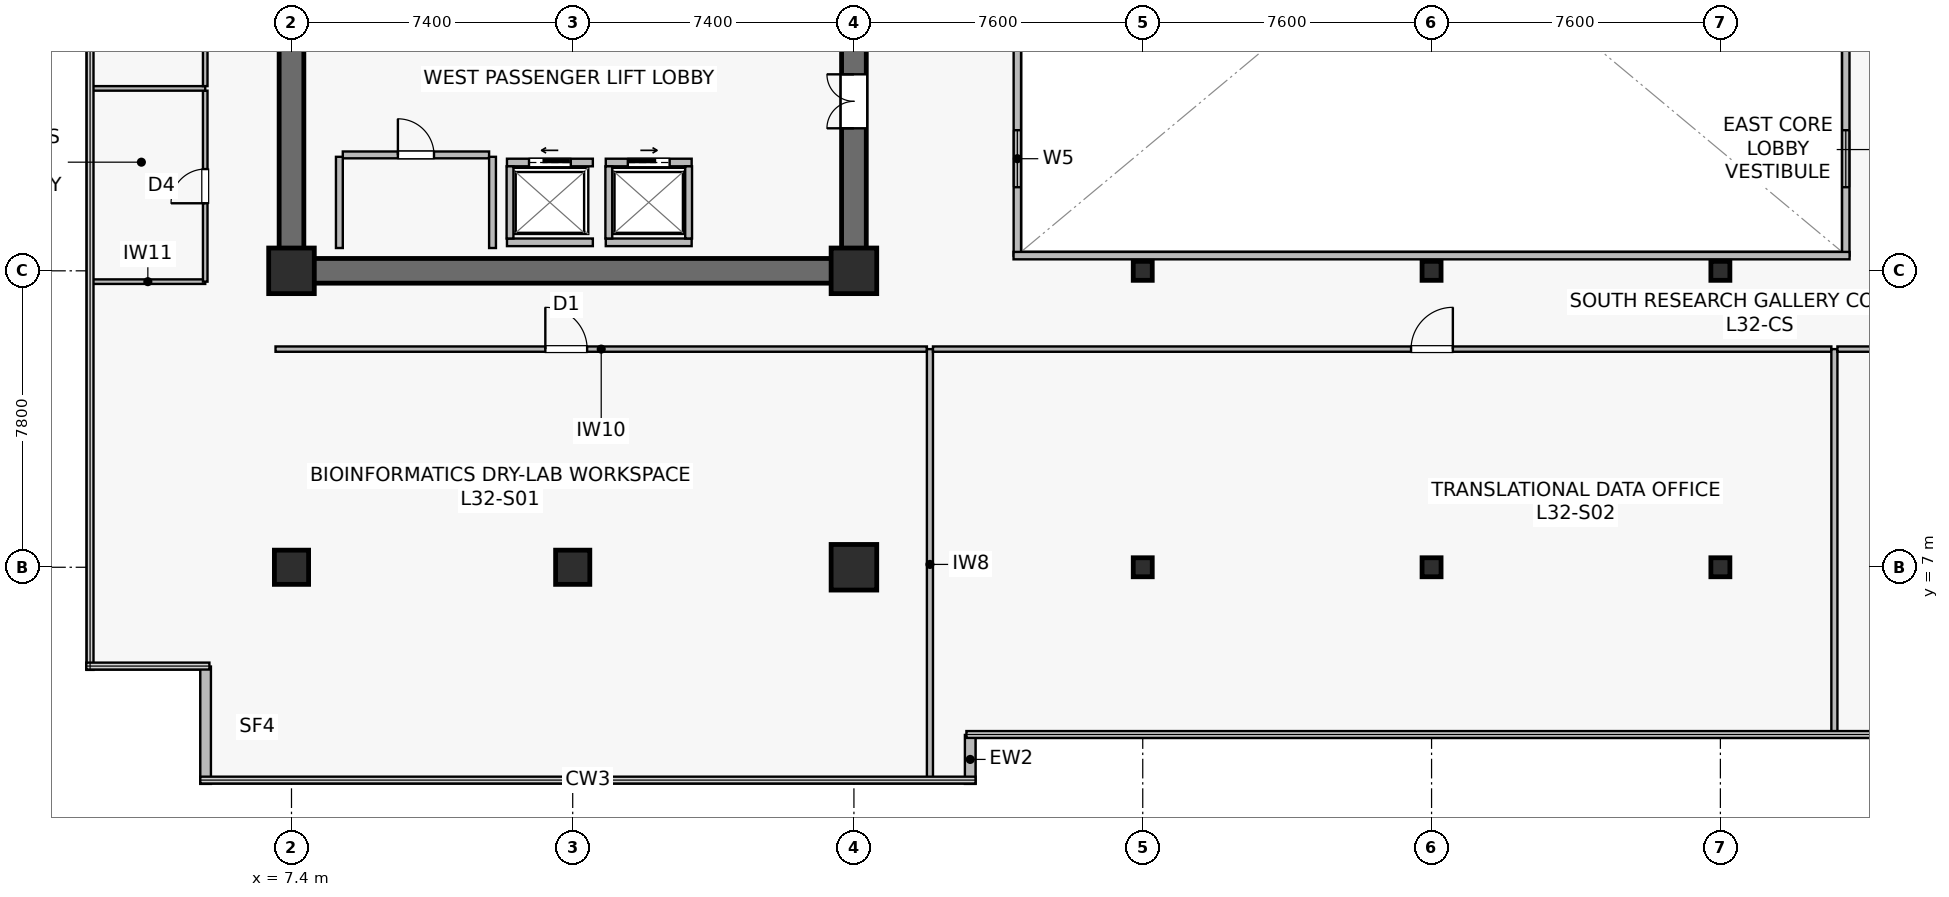
"""IFC4 building model, lengths in metres.
Left out: names, types, materials, properties, quantities, classifications, styles, units other than length and angle.
Written with IfcOpenShell. Run it as: python <this file> out.ifc"""

import sys

from ifc_helpers import new_model, si_unit, direction, frame, frame_2d, origin, origin_2d, place, context, subcontext, project, spatial, rectangle, hollow_rectangle, extrude, source, transform, mapped, element, fill, save


model = new_model("IFC4")
c1 = context("Model", 3, precision=1e-05, world=origin(), true_north=direction((0.0, 1.0)))
c2 = subcontext(c1, "Body", "Model", "MODEL_VIEW")
j1 = project(units=[si_unit("LENGTHUNIT", "METRE"), si_unit("PLANEANGLEUNIT", "RADIAN")], contexts=[c1])
p1 = place(None, origin())
s1 = spatial("IfcSite", under=j1, at=p1, CompositionType="ELEMENT")
p2 = place(p1, origin())
s2 = spatial("IfcBuilding", under=s1, at=p2, CompositionType="ELEMENT")
p3 = place(p2, frame((0.0, 0.0, 133.8)))
s3 = spatial("IfcBuildingStorey", under=s2, at=p3, CompositionType="ELEMENT", Elevation=133.8)
p4 = place(p3, frame((7.075, 14.8, 0.0), z_axis=(0.0, 0.0, 1.0), x_axis=(1.0, 0.0, 0.0)))
e1 = element("IfcWall", 1, at=p4, inside=s3, PredefinedType="SHEAR", context=c2, shape_type="SweptSolid", body=[
    extrude(rectangle(XDim=15.45, YDim=0.65, at=frame_2d((7.725, 0.0))), origin(), (0.0, 0.0, 1.0), 3.79),
])
p5 = place(p3, frame((7.4, 15.125, 0.0), z_axis=(0.0, 0.0, 1.0), x_axis=(0.0, 1.0, 0.0)))
e2 = element("IfcWall", 2, at=p5, inside=s3, PredefinedType="SHEAR", context=c2, shape_type="SweptSolid", body=[
    extrude(rectangle(XDim=18.35, YDim=0.65, at=frame_2d((9.175, 0.0))), origin(), (0.0, 0.0, 1.0), 3.79),
])
p6 = place(p3, frame((22.2, 15.125, 0.0), z_axis=(0.0, 0.0, 1.0), x_axis=(0.0, 1.0, 0.0)))
e3 = element("IfcWall", 3, at=p6, inside=s3, PredefinedType="SHEAR", context=c2, shape_type="SweptSolid", body=[
    extrude(rectangle(XDim=18.35, YDim=0.65, at=frame_2d((9.175, 0.0))), origin(), (0.0, 0.0, 1.0), 3.79),
])
p7 = place(p6, frame((3.425, 0.0, 0.0)))
e4 = element("IfcOpeningElement", 4, at=p7, cuts=e3, PredefinedType="OPENING", context=c2, shape_type="SweptSolid", body=[
    extrude(rectangle(XDim=1.42, YDim=2.2, at=frame_2d((0.71, 1.1))), frame((0.0, 0.335, 0.0), z_axis=(0.0, -1.0, 0.0), x_axis=(1.0, 0.0, 0.0)), (0.0, 0.0, 1.0), 0.67),
])
m1 = source(origin(), c2, "Body", "SweptSolid", [
    extrude(rectangle(XDim=0.9, YDim=0.9, at=origin_2d()), origin(), (0.0, 0.0, 1.0), 4.1),
])
p8 = place(p3, frame((14.8, 7.0, 0.0), z_axis=(0.0, 0.0, 1.0), x_axis=(1.0, 0.0, 0.0)))
e5 = element("IfcColumn", 5, at=p8, inside=s3, PredefinedType="COLUMN", context=c2, shape_type="MappedRepresentation", body=[
    mapped(m1, transform((0.0, 0.0, 0.0), scale=1.0)),
])
m2 = source(origin(), c2, "Body", "SweptSolid", [
    extrude(rectangle(XDim=1.2, YDim=1.2, at=origin_2d()), origin(), (0.0, 0.0, 1.0), 4.1),
])
for number, where, z_axis, x_axis in (
    (6, (22.2, 7.0, 0.0), (0.0, 0.0, 1.0), (1.0, 0.0, 0.0)),
    (7, (7.4, 14.8, 0.0), (0.0, 0.0, 1.0), (1.0, 0.0, 0.0)),
    (8, (22.2, 14.8, 0.0), (0.0, 0.0, 1.0), (1.0, 0.0, 0.0)),
):
    element("IfcColumn", number, at=place(p3, frame(where, z_axis=z_axis, x_axis=x_axis)), inside=s3, PredefinedType="COLUMN", context=c2, shape_type="MappedRepresentation", body=[
        mapped(m2, transform((0.0, 0.0, 0.0), scale=1.0)),
    ])
p9 = place(p3, frame((7.4, 7.0, 0.0), z_axis=(0.0, 0.0, 1.0), x_axis=(1.0, 0.0, 0.0)))
e9 = element("IfcColumn", 9, at=p9, inside=s3, PredefinedType="COLUMN", context=c2, shape_type="MappedRepresentation", body=[
    mapped(m1, transform((0.0, 0.0, 0.0), scale=1.0)),
])
m3 = source(origin(), c2, "Body", "SweptSolid", [
    extrude(hollow_rectangle(XDim=0.5, YDim=0.5, WallThickness=0.022, at=origin_2d()), origin(), (0.0, 0.0, 1.0), 4.1),
])
for number, where, z_axis, x_axis in (
    (10, (29.8, 7.0, 0.0), (0.0, 0.0, 1.0), (1.0, 0.0, 0.0)),
    (11, (29.8, 14.8, 0.0), (0.0, 0.0, 1.0), (1.0, 0.0, 0.0)),
    (12, (37.4, 7.0, 0.0), (0.0, 0.0, 1.0), (1.0, 0.0, 0.0)),
    (13, (37.4, 14.8, 0.0), (0.0, 0.0, 1.0), (1.0, 0.0, 0.0)),
    (14, (45.0, 7.0, 0.0), (0.0, 0.0, 1.0), (1.0, 0.0, 0.0)),
    (15, (45.0, 14.8, 0.0), (0.0, 0.0, 1.0), (1.0, 0.0, 0.0)),
):
    element("IfcColumn", number, at=place(p3, frame(where, z_axis=z_axis, x_axis=x_axis)), inside=s3, PredefinedType="COLUMN", context=c2, shape_type="MappedRepresentation", body=[
        mapped(m3, transform((0.0, 0.0, 0.0), scale=1.0)),
    ])
p10 = place(p3, frame((25.26, 1.3, 0.0), z_axis=(0.0, 0.0, 1.0), x_axis=(0.0, 1.0, 0.0)))
e16 = element("IfcWall", 16, at=p10, inside=s3, PredefinedType="STANDARD", context=c2, shape_type="SweptSolid", body=[
    extrude(rectangle(XDim=1.288, YDim=0.28, at=frame_2d((0.644, 0.0))), origin(), (0.0, 0.0, 1.0), 3.79),
])
p11 = place(p3, frame((5.14, 4.388, 0.0), z_axis=(0.0, 0.0, 1.0), x_axis=(0.0, -1.0, 0.0)))
e17 = element("IfcWall", 17, at=p11, inside=s3, PredefinedType="STANDARD", context=c2, shape_type="SweptSolid", body=[
    extrude(rectangle(XDim=3.088, YDim=0.28, at=frame_2d((1.544, 0.0))), origin(), (0.0, 0.0, 1.0), 3.79),
])
p12 = place(p3, frame((13.07, 17.65, 0.0), z_axis=(0.0, 0.0, 1.0), x_axis=(1.0, 0.0, 0.0)))
e18 = element("IfcWall", 18, at=p12, inside=s3, PredefinedType="SOLIDWALL", context=c2, shape_type="SweptSolid", body=[
    extrude(rectangle(XDim=2.26, YDim=0.2, at=frame_2d((1.13, 0.0))), origin(), (0.0, 0.0, 1.0), 3.125),
])
p13 = place(p12, frame((0.58, 0.0, 0.0)))
e19 = element("IfcOpeningElement", 19, at=p13, cuts=e18, PredefinedType="OPENING", context=c2, shape_type="SweptSolid", body=[
    extrude(rectangle(XDim=1.1, YDim=2.22, at=frame_2d((0.55, 1.11))), frame((0.0, 0.11, 0.0), z_axis=(0.0, -1.0, 0.0), x_axis=(1.0, 0.0, 0.0)), (0.0, 0.0, 1.0), 0.22),
])
p14 = place(p3, frame((13.07, 15.55, 0.0), z_axis=(0.0, 0.0, 1.0), x_axis=(1.0, 0.0, 0.0)))
e20 = element("IfcWall", 20, at=p14, inside=s3, PredefinedType="SOLIDWALL", context=c2, shape_type="SweptSolid", body=[
    extrude(rectangle(XDim=2.26, YDim=0.2, at=frame_2d((1.13, 0.0))), origin(), (0.0, 0.0, 1.0), 3.125),
])
p15 = place(p3, frame((13.15, 15.65, 0.0), z_axis=(0.0, 0.0, 1.0), x_axis=(0.0, 1.0, 0.0)))
e21 = element("IfcWall", 21, at=p15, inside=s3, PredefinedType="SOLIDWALL", context=c2, shape_type="SweptSolid", body=[
    extrude(rectangle(XDim=1.9, YDim=0.18, at=frame_2d((0.95, 0.0))), origin(), (0.0, 0.0, 1.0), 3.79),
])
p16 = place(p3, frame((15.67, 17.65, 0.0), z_axis=(0.0, 0.0, 1.0), x_axis=(1.0, 0.0, 0.0)))
e22 = element("IfcWall", 22, at=p16, inside=s3, PredefinedType="SOLIDWALL", context=c2, shape_type="SweptSolid", body=[
    extrude(rectangle(XDim=2.26, YDim=0.2, at=frame_2d((1.13, 0.0))), origin(), (0.0, 0.0, 1.0), 3.79),
])
p17 = place(p16, frame((0.58, 0.0, 0.0)))
e23 = element("IfcOpeningElement", 23, at=p17, cuts=e22, PredefinedType="OPENING", context=c2, shape_type="SweptSolid", body=[
    extrude(rectangle(XDim=1.1, YDim=2.22, at=frame_2d((0.55, 1.11))), frame((0.0, 0.11, 0.0), z_axis=(0.0, -1.0, 0.0), x_axis=(1.0, 0.0, 0.0)), (0.0, 0.0, 1.0), 0.22),
])
p18 = place(p3, frame((15.67, 15.55, 0.0), z_axis=(0.0, 0.0, 1.0), x_axis=(1.0, 0.0, 0.0)))
e24 = element("IfcWall", 24, at=p18, inside=s3, PredefinedType="SOLIDWALL", context=c2, shape_type="SweptSolid", body=[
    extrude(rectangle(XDim=2.26, YDim=0.2, at=frame_2d((1.13, 0.0))), origin(), (0.0, 0.0, 1.0), 3.79),
])
for number, where, z_axis, x_axis in (
    (25, (15.75, 15.65, 0.0), (0.0, 0.0, 1.0), (0.0, 1.0, 0.0)),
    (26, (17.85, 15.65, 0.0), (0.0, 0.0, 1.0), (0.0, 1.0, 0.0)),
):
    element("IfcWall", number, at=place(p3, frame(where, z_axis=z_axis, x_axis=x_axis)), inside=s3, PredefinedType="SOLIDWALL", context=c2, shape_type="SweptSolid", body=[
        extrude(rectangle(XDim=1.9, YDim=0.18, at=frame_2d((0.95, 0.0))), origin(), (0.0, 0.0, 1.0), 3.79),
    ])
p19 = place(p3, frame((8.75, 17.85, 0.0), z_axis=(0.0, 0.0, 1.0), x_axis=(1.0, 0.0, 0.0)))
e27 = element("IfcWall", 27, at=p19, inside=s3, PredefinedType="SOLIDWALL", context=c2, shape_type="SweptSolid", body=[
    extrude(rectangle(XDim=3.85, YDim=0.18, at=frame_2d((1.925, 0.0))), origin(), (0.0, 0.0, 1.0), 3.79),
])
p20 = place(p19, frame((1.45, 0.0, 0.0)))
e28 = element("IfcOpeningElement", 28, at=p20, cuts=e27, PredefinedType="OPENING", context=c2, shape_type="SweptSolid", body=[
    extrude(rectangle(XDim=0.95, YDim=2.15, at=frame_2d((0.475, 1.075))), frame((0.0, 0.1, 0.0), z_axis=(0.0, -1.0, 0.0), x_axis=(1.0, 0.0, 0.0)), (0.0, 0.0, 1.0), 0.2),
])
for number, where, z_axis, x_axis in (
    (29, (12.69, 15.4, 0.0), (0.0, 0.0, 1.0), (0.0, 1.0, 0.0)),
    (30, (8.66, 15.4, 0.0), (0.0, 0.0, 1.0), (0.0, 1.0, 0.0)),
):
    element("IfcWall", number, at=place(p3, frame(where, z_axis=z_axis, x_axis=x_axis)), inside=s3, PredefinedType="SOLIDWALL", context=c2, shape_type="SweptSolid", body=[
        extrude(rectangle(XDim=2.4, YDim=0.18, at=frame_2d((1.2, 0.0))), origin(), (0.0, 0.0, 1.0), 3.79),
    ])
p21 = place(p3, frame((26.5, 15.2, 0.0), z_axis=(0.0, 0.0, 1.0), x_axis=(0.0, 1.0, 0.0)))
e31 = element("IfcWall", 31, at=p21, inside=s3, PredefinedType="SOLIDWALL", context=c2, shape_type="SweptSolid", body=[
    extrude(rectangle(XDim=18.2, YDim=0.195, at=frame_2d((9.1, 0.0))), origin(), (0.0, 0.0, 1.0), 3.79),
])
p22 = place(p21, frame((1.8, 0.0, 0.9)))
e32 = element("IfcOpeningElement", 32, at=p22, cuts=e31, PredefinedType="OPENING", context=c2, shape_type="SweptSolid", body=[
    extrude(rectangle(XDim=1.5, YDim=1.4, at=frame_2d((0.75, 0.7))), frame((0.0, 0.107, 0.0), z_axis=(0.0, -1.0, 0.0), x_axis=(1.0, 0.0, 0.0)), (0.0, 0.0, 1.0), 0.215),
])
p23 = place(p21, frame((13.2, 0.0, 0.9)))
e33 = element("IfcOpeningElement", 33, at=p23, cuts=e31, PredefinedType="OPENING", context=c2, shape_type="SweptSolid", body=[
    extrude(rectangle(XDim=1.5, YDim=1.4, at=frame_2d((0.75, 0.7))), frame((0.0, 0.107, 0.0), z_axis=(0.0, -1.0, 0.0), x_axis=(1.0, 0.0, 0.0)), (0.0, 0.0, 1.0), 0.215),
])
p24 = place(p3, frame((48.3, 15.2, 0.0), z_axis=(0.0, 0.0, 1.0), x_axis=(0.0, 1.0, 0.0)))
e34 = element("IfcWall", 34, at=p24, inside=s3, PredefinedType="SOLIDWALL", context=c2, shape_type="SweptSolid", body=[
    extrude(rectangle(XDim=18.2, YDim=0.195, at=frame_2d((9.1, 0.0))), origin(), (0.0, 0.0, 1.0), 3.79),
])
p25 = place(p24, frame((1.8, 0.0, 0.9)))
e35 = element("IfcOpeningElement", 35, at=p25, cuts=e34, PredefinedType="OPENING", context=c2, shape_type="SweptSolid", body=[
    extrude(rectangle(XDim=1.5, YDim=1.4, at=frame_2d((0.75, 0.7))), frame((0.0, 0.107, 0.0), z_axis=(0.0, -1.0, 0.0), x_axis=(1.0, 0.0, 0.0)), (0.0, 0.0, 1.0), 0.215),
])
p26 = place(p24, frame((13.2, 0.0, 0.9)))
e36 = element("IfcOpeningElement", 36, at=p26, cuts=e34, PredefinedType="OPENING", context=c2, shape_type="SweptSolid", body=[
    extrude(rectangle(XDim=1.5, YDim=1.4, at=frame_2d((0.75, 0.7))), frame((0.0, 0.107, 0.0), z_axis=(0.0, -1.0, 0.0), x_axis=(1.0, 0.0, 0.0)), (0.0, 0.0, 1.0), 0.215),
])
p27 = place(p3, frame((26.4, 15.2, 0.0), z_axis=(0.0, 0.0, 1.0), x_axis=(1.0, 0.0, 0.0)))
e37 = element("IfcWall", 37, at=p27, inside=s3, PredefinedType="SOLIDWALL", context=c2, shape_type="SweptSolid", body=[
    extrude(rectangle(XDim=22.0, YDim=0.195, at=frame_2d((11.0, 0.0))), origin(), (0.0, 0.0, 1.0), 3.79),
])
p28 = place(p3, frame((6.98, 12.74, 0.0), z_axis=(0.0, 0.0, 1.0), x_axis=(1.0, 0.0, 0.0)))
e38 = element("IfcWall", 38, at=p28, inside=s3, PredefinedType="PARTITIONING", context=c2, shape_type="SweptSolid", body=[
    extrude(rectangle(XDim=17.14, YDim=0.14, at=frame_2d((8.57, 0.0))), origin(), (0.0, 0.0, 1.0), 3.125),
])
p29 = place(p28, frame((7.1, 0.0, 0.0)))
e39 = element("IfcOpeningElement", 39, at=p29, cuts=e38, PredefinedType="OPENING", context=c2, shape_type="SweptSolid", body=[
    extrude(rectangle(XDim=1.1, YDim=2.18, at=frame_2d((0.55, 1.09))), frame((0.0, 0.08, 0.0), z_axis=(0.0, -1.0, 0.0), x_axis=(1.0, 0.0, 0.0)), (0.0, 0.0, 1.0), 0.16),
])
p30 = place(p3, frame((24.2, 1.41, 0.0), z_axis=(0.0, 0.0, 1.0), x_axis=(0.0, 1.0, 0.0)))
e40 = element("IfcWall", 40, at=p30, inside=s3, PredefinedType="PARTITIONING", context=c2, shape_type="SweptSolid", body=[
    extrude(rectangle(XDim=11.33, YDim=0.16, at=frame_2d((5.665, 0.0))), origin(), (0.0, 0.0, 1.0), 3.075),
])
p31 = place(p3, frame((24.28, 12.74, 0.0), z_axis=(0.0, 0.0, 1.0), x_axis=(1.0, 0.0, 0.0)))
e41 = element("IfcWall", 41, at=p31, inside=s3, PredefinedType="PARTITIONING", context=c2, shape_type="SweptSolid", body=[
    extrude(rectangle(XDim=23.64, YDim=0.14, at=frame_2d((11.82, 0.0))), origin(), (0.0, 0.0, 1.0), 3.125),
])
p32 = place(p31, frame((12.58, 0.0, 0.0)))
e42 = element("IfcOpeningElement", 42, at=p32, cuts=e41, PredefinedType="OPENING", context=c2, shape_type="SweptSolid", body=[
    extrude(rectangle(XDim=1.1, YDim=2.18, at=frame_2d((0.55, 1.09))), frame((0.0, 0.08, 0.0), z_axis=(0.0, -1.0, 0.0), x_axis=(1.0, 0.0, 0.0)), (0.0, 0.0, 1.0), 0.16),
])
p33 = place(p3, frame((48.0, 2.61, 0.0), z_axis=(0.0, 0.0, 1.0), x_axis=(0.0, 1.0, 0.0)))
e43 = element("IfcWall", 43, at=p33, inside=s3, PredefinedType="PARTITIONING", context=c2, shape_type="SweptSolid", body=[
    extrude(rectangle(XDim=10.13, YDim=0.16, at=frame_2d((5.065, 0.0))), origin(), (0.0, 0.0, 1.0), 3.075),
])
p34 = place(p3, frame((48.08, 12.74, 0.0), z_axis=(0.0, 0.0, 1.0), x_axis=(1.0, 0.0, 0.0)))
e44 = element("IfcWall", 44, at=p34, inside=s3, PredefinedType="PARTITIONING", context=c2, shape_type="SweptSolid", body=[
    extrude(rectangle(XDim=19.74, YDim=0.14, at=frame_2d((9.87, 0.0))), origin(), (0.0, 0.0, 1.0), 3.125),
])
p35 = place(p34, frame((8.244, 0.0, 0.0)))
e45 = element("IfcOpeningElement", 45, at=p35, cuts=e44, PredefinedType="OPENING", context=c2, shape_type="SweptSolid", body=[
    extrude(rectangle(XDim=1.1, YDim=2.18, at=frame_2d((0.55, 1.09))), frame((0.0, 0.08, 0.0), z_axis=(0.0, -1.0, 0.0), x_axis=(1.0, 0.0, 0.0)), (0.0, 0.0, 1.0), 0.16),
])
p36 = place(p3, frame((2.11, 14.515, 0.0), z_axis=(0.0, 0.0, 1.0), x_axis=(1.0, 0.0, 0.0)))
e46 = element("IfcWall", 46, at=p36, inside=s3, PredefinedType="PARTITIONING", context=c2, shape_type="SweptSolid", body=[
    extrude(rectangle(XDim=3.02, YDim=0.12, at=frame_2d((1.51, 0.0))), origin(), (0.0, 0.0, 1.0), 3.79),
])
p37 = place(p3, frame((5.13, 14.515, 0.0), z_axis=(0.0, 0.0, 1.0), x_axis=(0.0, 1.0, 0.0)))
e47 = element("IfcWall", 47, at=p37, inside=s3, PredefinedType="PARTITIONING", context=c2, shape_type="SweptSolid", body=[
    extrude(rectangle(XDim=5.025, YDim=0.12, at=frame_2d((2.513, 0.0))), origin(), (0.0, 0.0, 1.0), 3.79),
])
p38 = place(p37, frame((2.062, 0.0, 0.0)))
e48 = element("IfcOpeningElement", 48, at=p38, cuts=e47, PredefinedType="OPENING", context=c2, shape_type="SweptSolid", body=[
    extrude(rectangle(XDim=0.9, YDim=2.1, at=frame_2d((0.45, 1.05))), frame((0.0, 0.07, 0.0), z_axis=(0.0, -1.0, 0.0), x_axis=(1.0, 0.0, 0.0)), (0.0, 0.0, 1.0), 0.14),
])
p39 = place(p3, frame((2.11, 19.6, 0.0), z_axis=(0.0, 0.0, 1.0), x_axis=(1.0, 0.0, 0.0)))
e49 = element("IfcWall", 49, at=p39, inside=s3, PredefinedType="PARTITIONING", context=c2, shape_type="SweptSolid", body=[
    extrude(rectangle(XDim=3.02, YDim=0.12, at=frame_2d((1.51, 0.0))), origin(), (0.0, 0.0, 1.0), 3.79),
])
p40 = place(p3, frame((5.13, 19.66, 0.0), z_axis=(0.0, 0.0, 1.0), x_axis=(0.0, 1.0, 0.0)))
e50 = element("IfcWall", 50, at=p40, inside=s3, PredefinedType="PARTITIONING", context=c2, shape_type="SweptSolid", body=[
    extrude(rectangle(XDim=7.08, YDim=0.12, at=frame_2d((3.54, 0.0))), origin(), (0.0, 0.0, 1.0), 3.79),
])
p41 = place(p40, frame((3.09, 0.0, 0.0)))
e51 = element("IfcOpeningElement", 51, at=p41, cuts=e50, PredefinedType="OPENING", context=c2, shape_type="SweptSolid", body=[
    extrude(rectangle(XDim=0.9, YDim=2.1, at=frame_2d((0.45, 1.05))), frame((0.0, 0.07, 0.0), z_axis=(0.0, -1.0, 0.0), x_axis=(1.0, 0.0, 0.0)), (0.0, 0.0, 1.0), 0.14),
])
m4 = source(origin(), c2, "Body", "SweptSolid", [
    extrude(rectangle(XDim=1.5, YDim=1.4, at=frame_2d((0.75, 0.7))), frame((0.0, 0.03, 0.0), z_axis=(0.0, -1.0, 0.0), x_axis=(1.0, 0.0, 0.0)), (0.0, 0.0, 1.0), 0.06),
])
p42 = place(p22, origin())
e52 = element("IfcWindow", 52, at=p42, inside=s3, PartitioningType="SINGLE_PANEL", PredefinedType="WINDOW", context=c2, shape_type="MappedRepresentation", body=[
    mapped(m4, transform((0.0, 0.0, 0.0), scale=1.0)),
])
fill(e32, e52)
p43 = place(p25, origin())
e53 = element("IfcWindow", 53, at=p43, inside=s3, PartitioningType="SINGLE_PANEL", PredefinedType="WINDOW", context=c2, shape_type="MappedRepresentation", body=[
    mapped(m4, transform((0.0, 0.0, 0.0), scale=1.0)),
])
fill(e35, e53)
m5 = source(origin(), c2, "Body", "SweptSolid", [
    extrude(rectangle(XDim=1.1, YDim=2.22, at=frame_2d((0.55, 1.11))), frame((0.0, 0.025, 0.0), z_axis=(0.0, -1.0, 0.0), x_axis=(1.0, 0.0, 0.0)), (0.0, 0.0, 1.0), 0.05),
])
p44 = place(p13, origin())
e54 = element("IfcDoor", 54, at=p44, inside=s3, OperationType="SLIDING_TO_LEFT", PredefinedType="USERDEFINED", context=c2, shape_type="MappedRepresentation", body=[
    mapped(m5, transform((0.0, 0.0, 0.0), scale=1.0)),
])
fill(e19, e54)
p45 = place(p17, origin())
e55 = element("IfcDoor", 55, at=p45, inside=s3, OperationType="SLIDING_TO_RIGHT", PredefinedType="USERDEFINED", context=c2, shape_type="MappedRepresentation", body=[
    mapped(m5, transform((0.0, 0.0, 0.0), scale=1.0)),
])
fill(e23, e55)
m6 = source(origin(), c2, "Body", "SweptSolid", [
    extrude(rectangle(XDim=0.95, YDim=2.15, at=frame_2d((0.475, 1.075))), frame((0.0, 0.025, 0.0), z_axis=(0.0, -1.0, 0.0), x_axis=(1.0, 0.0, 0.0)), (0.0, 0.0, 1.0), 0.05),
])
p46 = place(p20, origin())
e56 = element("IfcDoor", 56, at=p46, inside=s3, OperationType="SINGLE_SWING_LEFT", PredefinedType="DOOR", context=c2, shape_type="MappedRepresentation", body=[
    mapped(m6, transform((0.0, 0.0, 0.0), scale=1.0)),
])
fill(e28, e56)
m7 = source(origin(), c2, "Body", "SweptSolid", [
    extrude(rectangle(XDim=1.42, YDim=2.2, at=frame_2d((0.71, 1.1))), frame((0.0, 0.025, 0.0), z_axis=(0.0, -1.0, 0.0), x_axis=(1.0, 0.0, 0.0)), (0.0, 0.0, 1.0), 0.05),
])
p47 = place(p7, origin())
e57 = element("IfcDoor", 57, at=p47, inside=s3, OperationType="DOUBLE_DOOR_SINGLE_SWING", PredefinedType="DOOR", context=c2, shape_type="MappedRepresentation", body=[
    mapped(m7, transform((0.0, 0.0, 0.0), scale=1.0)),
])
fill(e4, e57)
m8 = source(origin(), c2, "Body", "SweptSolid", [
    extrude(rectangle(XDim=1.1, YDim=2.18, at=frame_2d((0.55, 1.09))), frame((0.0, 0.025, 0.0), z_axis=(0.0, -1.0, 0.0), x_axis=(1.0, 0.0, 0.0)), (0.0, 0.0, 1.0), 0.05),
])
p48 = place(p29, origin())
e58 = element("IfcDoor", 58, at=p48, inside=s3, OperationType="SINGLE_SWING_LEFT", PredefinedType="DOOR", context=c2, shape_type="MappedRepresentation", body=[
    mapped(m8, transform((0.0, 0.0, 0.0), scale=1.0)),
])
fill(e39, e58)
p49 = place(p32, origin())
e59 = element("IfcDoor", 59, at=p49, inside=s3, OperationType="SINGLE_SWING_RIGHT", PredefinedType="DOOR", context=c2, shape_type="MappedRepresentation", body=[
    mapped(m8, transform((0.0, 0.0, 0.0), scale=1.0)),
])
fill(e42, e59)
m9 = source(origin(), c2, "Body", "SweptSolid", [
    extrude(rectangle(XDim=0.9, YDim=2.1, at=frame_2d((0.45, 1.05))), frame((0.0, 0.025, 0.0), z_axis=(0.0, -1.0, 0.0), x_axis=(1.0, 0.0, 0.0)), (0.0, 0.0, 1.0), 0.05),
])
p50 = place(p38, origin())
e60 = element("IfcDoor", 60, at=p50, inside=s3, OperationType="SINGLE_SWING_LEFT", PredefinedType="DOOR", context=c2, shape_type="MappedRepresentation", body=[
    mapped(m9, transform((0.0, 0.0, 0.0), scale=1.0)),
])
fill(e48, e60)
save(model, sys.argv[1])
